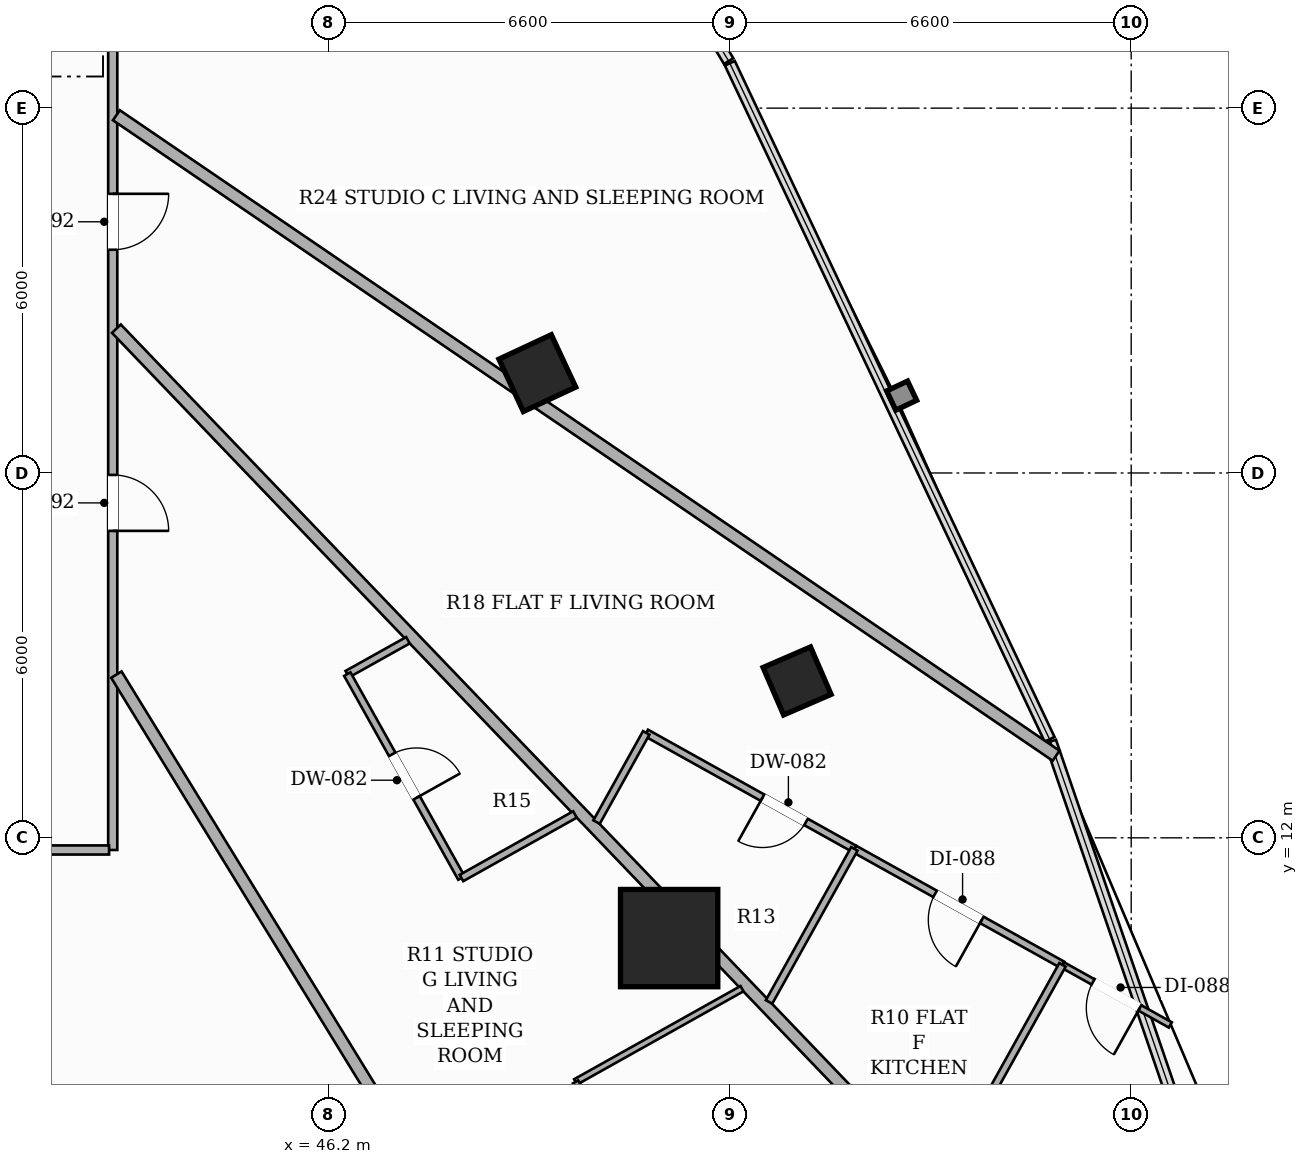
"""IFC4 building model, lengths in metres.
Left out: names, types, materials, properties, quantities, classifications, styles, units other than length and angle.
Written with IfcOpenShell. Run it as: python <this file> out.ifc"""

import sys

from ifc_helpers import new_model, si_unit, direction, frame, frame_2d, origin, origin_2d, place, context, subcontext, project, spatial, rectangle, hollow_rectangle, extrude, element, fill, save


model = new_model("IFC4")
c1 = context("Model", 3, precision=1e-05, world=origin(), true_north=direction((0.0, 1.0)))
c2 = subcontext(c1, "Body", "Model", "MODEL_VIEW")
j1 = project(units=[si_unit("LENGTHUNIT", "METRE"), si_unit("PLANEANGLEUNIT", "RADIAN")], contexts=[c1])
p1 = place(None, origin())
s1 = spatial("IfcSite", under=j1, at=p1, CompositionType="ELEMENT")
p2 = place(p1, origin())
s2 = spatial("IfcBuilding", under=s1, at=p2, CompositionType="ELEMENT")
p3 = place(p2, frame((0.0, 0.0, 77.45)))
s3 = spatial("IfcBuildingStorey", under=s2, at=p3, CompositionType="ELEMENT", Elevation=77.45)
p4 = place(p3, frame((51.801, 10.351, 0.0), z_axis=(0.0, 0.0, 1.0), x_axis=(1.0, 0.0, 0.0)))
e1 = element("IfcColumn", 1, at=p4, inside=s3, PredefinedType="COLUMN", context=c2, shape_type="SweptSolid", body=[
    extrude(hollow_rectangle(XDim=1.6, YDim=1.6, WallThickness=0.05, at=origin_2d()), origin(), (0.0, 0.0, 1.0), 3.3),
])
p5 = place(p3, frame((49.633, 19.642, 0.0), z_axis=(0.0, 0.0, 1.0), x_axis=(-0.422618261741, 0.906307787037, 0.0)))
e2 = element("IfcColumn", 2, at=p5, inside=s3, PredefinedType="COLUMN", context=c2, shape_type="SweptSolid", body=[
    extrude(hollow_rectangle(XDim=0.95, YDim=0.95, WallThickness=0.032, at=origin_2d()), origin(), (0.0, 0.0, 1.0), 3.3),
])
p6 = place(p3, frame((53.905, 14.58, 0.0), z_axis=(0.0, 0.0, 1.0), x_axis=(-0.397147890635, 0.917754625684, 0.0)))
e3 = element("IfcColumn", 3, at=p6, inside=s3, PredefinedType="COLUMN", context=c2, shape_type="SweptSolid", body=[
    extrude(hollow_rectangle(XDim=0.85, YDim=0.85, WallThickness=0.028, at=origin_2d()), origin(), (0.0, 0.0, 1.0), 3.3),
])
p7 = place(p3, frame((42.65, 36.84, 0.0), z_axis=(0.0, 0.0, 1.0), x_axis=(0.0, -1.0, 0.0)))
e4 = element("IfcWall", 4, at=p7, inside=s3, PredefinedType="PARTITIONING", context=c2, shape_type="SweptSolid", body=[
    extrude(rectangle(XDim=25.04, YDim=0.15, at=frame_2d((12.52, 0.0))), origin(), (0.0, 0.0, 1.0), 2.413),
])
p8 = place(p7, frame((6.171, 0.0, 0.0)))
e5 = element("IfcOpeningElement", 5, at=p8, cuts=e4, PredefinedType="OPENING", context=c2, shape_type="SweptSolid", body=[
    extrude(rectangle(XDim=0.92, YDim=2.15, at=frame_2d((0.46, 1.075))), frame((0.0, 0.085, 0.0), z_axis=(0.0, -1.0, 0.0), x_axis=(1.0, 0.0, 0.0)), (0.0, 0.0, 1.0), 0.17),
])
p9 = place(p7, frame((14.249, 0.0, 0.0)))
e6 = element("IfcOpeningElement", 6, at=p9, cuts=e4, PredefinedType="OPENING", context=c2, shape_type="SweptSolid", body=[
    extrude(rectangle(XDim=0.92, YDim=2.15, at=frame_2d((0.46, 1.075))), frame((0.0, 0.085, 0.0), z_axis=(0.0, -1.0, 0.0), x_axis=(1.0, 0.0, 0.0)), (0.0, 0.0, 1.0), 0.17),
])
p10 = place(p7, frame((18.872, 0.0, 0.0)))
e7 = element("IfcOpeningElement", 7, at=p10, cuts=e4, PredefinedType="OPENING", context=c2, shape_type="SweptSolid", body=[
    extrude(rectangle(XDim=0.92, YDim=2.15, at=frame_2d((0.46, 1.075))), frame((0.0, 0.085, 0.0), z_axis=(0.0, -1.0, 0.0), x_axis=(1.0, 0.0, 0.0)), (0.0, 0.0, 1.0), 0.17),
])
p11 = place(p3, frame((42.59, 11.8, 0.0), z_axis=(0.0, 0.0, 1.0), x_axis=(-1.0, 0.0, 0.0)))
e8 = element("IfcWall", 8, at=p11, inside=s3, PredefinedType="PARTITIONING", context=c2, shape_type="SweptSolid", body=[
    extrude(rectangle(XDim=19.24, YDim=0.15, at=frame_2d((9.62, 0.0))), origin(), (0.0, 0.0, 1.0), 2.669),
])
p12 = place(p11, frame((9.24, 0.0, 0.0)))
e9 = element("IfcOpeningElement", 9, at=p12, cuts=e8, PredefinedType="OPENING", context=c2, shape_type="SweptSolid", body=[
    extrude(rectangle(XDim=0.88, YDim=2.1, at=frame_2d((0.44, 1.05))), frame((0.0, 0.085, 0.0), z_axis=(0.0, -1.0, 0.0), x_axis=(1.0, 0.0, 0.0)), (0.0, 0.0, 1.0), 0.17),
])
p13 = place(p11, frame((2.174, 0.0, 0.0)))
e10 = element("IfcOpeningElement", 10, at=p13, cuts=e8, PredefinedType="OPENING", context=c2, shape_type="SweptSolid", body=[
    extrude(rectangle(XDim=0.88, YDim=2.1, at=frame_2d((0.44, 1.05))), frame((0.0, 0.085, 0.0), z_axis=(0.0, -1.0, 0.0), x_axis=(1.0, 0.0, 0.0)), (0.0, 0.0, 1.0), 0.17),
])
p14 = place(p3, frame((58.165, 13.35, 0.0), z_axis=(0.0, 0.0, 1.0), x_axis=(-0.826341659386, 0.563169123766, 0.0)))
e11 = element("IfcWall", 11, at=p14, inside=s3, PredefinedType="PARTITIONING", context=c2, shape_type="SweptSolid", body=[
    extrude(rectangle(XDim=18.703, YDim=0.2, at=frame_2d((9.352, 0.0))), origin(), (0.0, 0.0, 1.0), 2.413),
])
p15 = place(p3, frame((58.237, 4.179, 0.0), z_axis=(0.0, 0.0, 1.0), x_axis=(-0.69208567792, 0.721815360337, 0.0)))
e12 = element("IfcWall", 12, at=p15, inside=s3, PredefinedType="PARTITIONING", context=c2, shape_type="SweptSolid", body=[
    extrude(rectangle(XDim=22.435, YDim=0.2, at=frame_2d((11.218, 0.0))), origin(), (0.0, 0.0, 1.0), 2.413),
])
p16 = place(p3, frame((49.827, 3.09, 0.0), z_axis=(0.0, 0.0, 1.0), x_axis=(-0.523146880199, 0.852242536921, 0.0)))
e13 = element("IfcWall", 13, at=p16, inside=s3, PredefinedType="PARTITIONING", context=c2, shape_type="SweptSolid", body=[
    extrude(rectangle(XDim=13.604, YDim=0.2, at=frame_2d((6.802, 0.0))), origin(), (0.0, 0.0, 1.0), 2.413),
])
p17 = place(p3, frame((54.847, 11.818, 0.0), z_axis=(0.0, 0.0, 1.0), x_axis=(-0.87346578699, 0.486885529624, 0.0)))
e14 = element("IfcWall", 14, at=p17, inside=s3, PredefinedType="PARTITIONING", context=c2, shape_type="SweptSolid", body=[
    extrude(rectangle(XDim=3.919, YDim=0.12, at=frame_2d((1.959, 0.0))), origin(), (0.0, 0.0, 1.0), 2.413),
])
p18 = place(p17, frame((0.91, 0.0, 0.0)))
e15 = element("IfcOpeningElement", 15, at=p18, cuts=e14, PredefinedType="OPENING", context=c2, shape_type="SweptSolid", body=[
    extrude(rectangle(XDim=0.82, YDim=2.1, at=frame_2d((0.41, 1.05))), frame((0.0, 0.07, 0.0), z_axis=(0.0, -1.0, 0.0), x_axis=(1.0, 0.0, 0.0)), (0.0, 0.0, 1.0), 0.14),
])
p19 = place(p3, frame((51.424, 13.726, 0.0), z_axis=(0.0, 0.0, 1.0), x_axis=(-0.486605473044, -0.873621836726, 0.0)))
e16 = element("IfcWall", 16, at=p19, inside=s3, PredefinedType="PARTITIONING", context=c2, shape_type="SweptSolid", body=[
    extrude(rectangle(XDim=1.679, YDim=0.12, at=frame_2d((0.84, 0.0))), origin(), (0.0, 0.0, 1.0), 2.413),
])
p20 = place(p3, frame((58.27, 9.911, 0.0), z_axis=(0.0, 0.0, 1.0), x_axis=(-0.873560029318, 0.486716421727, 0.0)))
e17 = element("IfcWall", 17, at=p20, inside=s3, PredefinedType="PARTITIONING", context=c2, shape_type="SweptSolid", body=[
    extrude(rectangle(XDim=3.918, YDim=0.12, at=frame_2d((1.959, 0.0))), origin(), (0.0, 0.0, 1.0), 2.619),
])
p21 = place(p20, frame((1.519, 0.0, 0.0)))
e18 = element("IfcOpeningElement", 18, at=p21, cuts=e17, PredefinedType="OPENING", context=c2, shape_type="SweptSolid", body=[
    extrude(rectangle(XDim=0.88, YDim=2.1, at=frame_2d((0.44, 1.05))), frame((0.0, 0.07, 0.0), z_axis=(0.0, -1.0, 0.0), x_axis=(1.0, 0.0, 0.0)), (0.0, 0.0, 1.0), 0.14),
])
p22 = place(p3, frame((60.044, 8.923, 0.0), z_axis=(0.0, 0.0, 1.0), x_axis=(-0.873680423781, 0.486500274514, 0.0)))
e19 = element("IfcWall", 19, at=p22, inside=s3, PredefinedType="PARTITIONING", context=c2, shape_type="SweptSolid", body=[
    extrude(rectangle(XDim=2.031, YDim=0.1, at=frame_2d((1.015, 0.0))), origin(), (0.0, 0.0, 1.0), 3.06),
])
p23 = place(p22, frame((0.575, 0.0, 0.0)))
e20 = element("IfcOpeningElement", 20, at=p23, cuts=e19, PredefinedType="OPENING", context=c2, shape_type="SweptSolid", body=[
    extrude(rectangle(XDim=0.88, YDim=2.1, at=frame_2d((0.44, 1.05))), frame((0.0, 0.06, 0.0), z_axis=(0.0, -1.0, 0.0), x_axis=(1.0, 0.0, 0.0)), (0.0, 0.0, 1.0), 0.12),
])
p24 = place(p3, frame((54.847, 11.818, 0.0), z_axis=(0.0, 0.0, 1.0), x_axis=(-0.486822226103, -0.873501070504, 0.0)))
e21 = element("IfcWall", 21, at=p24, inside=s3, PredefinedType="PARTITIONING", context=c2, shape_type="SweptSolid", body=[
    extrude(rectangle(XDim=2.882, YDim=0.12, at=frame_2d((1.441, 0.0))), origin(), (0.0, 0.0, 1.0), 3.06),
])
p25 = place(p3, frame((58.27, 9.911, 0.0), z_axis=(0.0, 0.0, 1.0), x_axis=(-0.486824622959, -0.873499734677, 0.0)))
e22 = element("IfcWall", 22, at=p25, inside=s3, PredefinedType="PARTITIONING", context=c2, shape_type="SweptSolid", body=[
    extrude(rectangle(XDim=4.086, YDim=0.12, at=frame_2d((2.043, 0.0))), origin(), (0.0, 0.0, 1.0), 3.06),
])
p26 = place(p3, frame((47.505, 15.249, 0.0), z_axis=(0.0, 0.0, 1.0), x_axis=(-0.872914025969, -0.487874064967, 0.0)))
e23 = element("IfcWall", 23, at=p26, inside=s3, PredefinedType="PARTITIONING", context=c2, shape_type="SweptSolid", body=[
    extrude(rectangle(XDim=1.142, YDim=0.12, at=frame_2d((0.571, 0.0))), origin(), (0.0, 0.0, 1.0), 3.06),
])
p27 = place(p3, frame((46.508, 14.692, 0.0), z_axis=(0.0, 0.0, 1.0), x_axis=(0.488483407483, -0.872573183529, 0.0)))
e24 = element("IfcWall", 24, at=p27, inside=s3, PredefinedType="PARTITIONING", context=c2, shape_type="SweptSolid", body=[
    extrude(rectangle(XDim=3.843, YDim=0.12, at=frame_2d((1.921, 0.0))), origin(), (0.0, 0.0, 1.0), 3.06),
])
p28 = place(p27, frame((1.511, 0.0, 0.0)))
e25 = element("IfcOpeningElement", 25, at=p28, cuts=e24, PredefinedType="OPENING", context=c2, shape_type="SweptSolid", body=[
    extrude(rectangle(XDim=0.82, YDim=2.1, at=frame_2d((0.41, 1.05))), frame((0.0, 0.07, 0.0), z_axis=(0.0, -1.0, 0.0), x_axis=(1.0, 0.0, 0.0)), (0.0, 0.0, 1.0), 0.14),
])
p29 = place(p3, frame((48.385, 11.339, 0.0), z_axis=(0.0, 0.0, 1.0), x_axis=(0.872618854318, 0.488401817246, 0.0)))
e26 = element("IfcWall", 26, at=p29, inside=s3, PredefinedType="PARTITIONING", context=c2, shape_type="SweptSolid", body=[
    extrude(rectangle(XDim=2.139, YDim=0.12, at=frame_2d((1.07, 0.0))), origin(), (0.0, 0.0, 1.0), 2.413),
])
p30 = place(p3, frame((52.999, 9.519, 0.0), z_axis=(0.0, 0.0, 1.0), x_axis=(-0.87247814598, -0.488653133406, 0.0)))
e27 = element("IfcWall", 27, at=p30, inside=s3, PredefinedType="PARTITIONING", context=c2, shape_type="SweptSolid", body=[
    extrude(rectangle(XDim=3.137, YDim=0.1, at=frame_2d((1.569, 0.0))), origin(), (0.0, 0.0, 1.0), 2.413),
])
p31 = place(p3, frame((50.262, 7.986, 0.0), z_axis=(0.0, 0.0, 1.0), x_axis=(0.488564666262, -0.872527688317, 0.0)))
e28 = element("IfcWall", 28, at=p31, inside=s3, PredefinedType="PARTITIONING", context=c2, shape_type="SweptSolid", body=[
    extrude(rectangle(XDim=3.842, YDim=0.1, at=frame_2d((1.921, 0.0))), origin(), (0.0, 0.0, 1.0), 2.413),
])
p32 = place(p31, frame((1.481, 0.0, 0.0)))
e29 = element("IfcOpeningElement", 29, at=p32, cuts=e28, PredefinedType="OPENING", context=c2, shape_type="SweptSolid", body=[
    extrude(rectangle(XDim=0.88, YDim=2.1, at=frame_2d((0.44, 1.05))), frame((0.0, 0.06, 0.0), z_axis=(0.0, -1.0, 0.0), x_axis=(1.0, 0.0, 0.0)), (0.0, 0.0, 1.0), 0.12),
])
p33 = place(p9, origin())
e30 = element("IfcDoor", 30, at=p33, inside=s3, OperationType="SINGLE_SWING_LEFT", PredefinedType="DOOR", context=c2, shape_type="SweptSolid", body=[
    extrude(rectangle(XDim=0.92, YDim=2.15, at=frame_2d((0.46, 1.075))), frame((0.0, 0.025, 0.0), z_axis=(0.0, -1.0, 0.0), x_axis=(1.0, 0.0, 0.0)), (0.0, 0.0, 1.0), 0.05),
])
fill(e6, e30)
p34 = place(p18, origin())
e31 = element("IfcDoor", 31, at=p34, inside=s3, OperationType="SINGLE_SWING_RIGHT", PredefinedType="DOOR", context=c2, shape_type="SweptSolid", body=[
    extrude(rectangle(XDim=0.82, YDim=2.1, at=frame_2d((0.41, 1.05))), frame((0.0, 0.025, 0.0), z_axis=(0.0, -1.0, 0.0), x_axis=(1.0, 0.0, 0.0)), (0.0, 0.0, 1.0), 0.05),
])
fill(e15, e31)
p35 = place(p21, origin())
e32 = element("IfcDoor", 32, at=p35, inside=s3, OperationType="SINGLE_SWING_LEFT", PredefinedType="DOOR", context=c2, shape_type="SweptSolid", body=[
    extrude(rectangle(XDim=0.88, YDim=2.1, at=frame_2d((0.44, 1.05))), frame((0.0, 0.025, 0.0), z_axis=(0.0, -1.0, 0.0), x_axis=(1.0, 0.0, 0.0)), (0.0, 0.0, 1.0), 0.05),
])
fill(e18, e32)
p36 = place(p23, origin())
e33 = element("IfcDoor", 33, at=p36, inside=s3, OperationType="SINGLE_SWING_LEFT", PredefinedType="DOOR", context=c2, shape_type="SweptSolid", body=[
    extrude(rectangle(XDim=0.88, YDim=2.1, at=frame_2d((0.44, 1.05))), frame((0.0, 0.025, 0.0), z_axis=(0.0, -1.0, 0.0), x_axis=(1.0, 0.0, 0.0)), (0.0, 0.0, 1.0), 0.05),
])
fill(e20, e33)
p37 = place(p10, origin())
e34 = element("IfcDoor", 34, at=p37, inside=s3, OperationType="SINGLE_SWING_RIGHT", PredefinedType="DOOR", context=c2, shape_type="SweptSolid", body=[
    extrude(rectangle(XDim=0.92, YDim=2.15, at=frame_2d((0.46, 1.075))), frame((0.0, 0.025, 0.0), z_axis=(0.0, -1.0, 0.0), x_axis=(1.0, 0.0, 0.0)), (0.0, 0.0, 1.0), 0.05),
])
fill(e7, e34)
p38 = place(p28, origin())
e35 = element("IfcDoor", 35, at=p38, inside=s3, OperationType="SINGLE_SWING_RIGHT", PredefinedType="DOOR", context=c2, shape_type="SweptSolid", body=[
    extrude(rectangle(XDim=0.82, YDim=2.1, at=frame_2d((0.41, 1.05))), frame((0.0, 0.025, 0.0), z_axis=(0.0, -1.0, 0.0), x_axis=(1.0, 0.0, 0.0)), (0.0, 0.0, 1.0), 0.05),
])
fill(e25, e35)
save(model, sys.argv[1])
